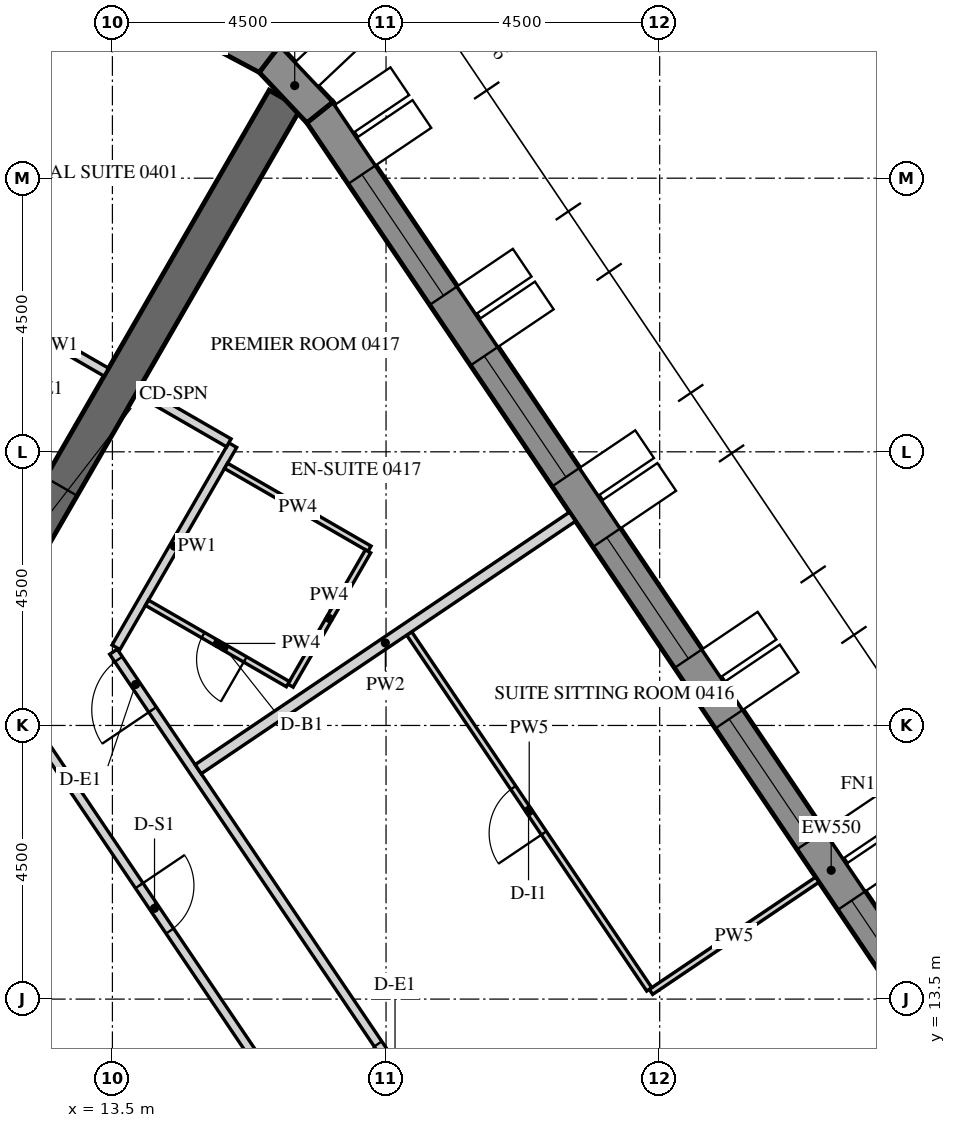
"""IFC4 building model, lengths in metres.
Left out: names, types, materials, properties, quantities, classifications, styles, units other than length and angle.
Written with IfcOpenShell. Run it as: python <this file> out.ifc"""

import sys

from ifc_helpers import new_model, si_unit, direction, frame, frame_2d, origin, place, context, subcontext, project, spatial, polyline, rectangle, outline, extrude, element, fill, save


model = new_model("IFC4")
c1 = context("Model", 3, precision=1e-05, world=origin(), true_north=direction((0.0, 1.0)))
c2 = subcontext(c1, "Body", "Model", "MODEL_VIEW")
j1 = project(units=[si_unit("LENGTHUNIT", "METRE"), si_unit("PLANEANGLEUNIT", "RADIAN")], contexts=[c1])
p1 = place(None, origin())
s1 = spatial("IfcSite", under=j1, at=p1, CompositionType="ELEMENT")
p2 = place(p1, origin())
s2 = spatial("IfcBuilding", under=s1, at=p2, CompositionType="ELEMENT")
p3 = place(p2, frame((0.0, 0.0, 68.7)))
s3 = spatial("IfcBuildingStorey", under=s2, at=p3, CompositionType="ELEMENT", Elevation=68.7)
p4 = place(p3, frame((33.728, 3.153, -0.15), z_axis=(0.0, 0.0, 1.0), x_axis=(-0.559192411416, 0.82903790445, 0.0)))
e1 = element("IfcWall", 1, at=p4, inside=s3, PredefinedType="SOLIDWALL", context=c2, shape_type="SweptSolid", body=[
    extrude(outline(polyline([(-0.026, -0.275), (30.093, -0.275), (30.048, 0.275), (0.026, 0.275), (-0.026, -0.275)])), origin(), (0.0, 0.0, 1.0), 3.9),
])
p5 = place(p4, frame((1.236, 0.0, 1.05)))
e2 = element("IfcOpeningElement", 2, at=p5, cuts=e1, PredefinedType="OPENING", context=c2, shape_type="SweptSolid", body=[
    extrude(rectangle(XDim=2.4, YDim=2.4, at=frame_2d((1.2, 1.2))), frame((0.0, 0.285, 0.0), z_axis=(0.0, -1.0, 0.0), x_axis=(1.0, 0.0, 0.0)), (0.0, 0.0, 1.0), 0.57),
])
p6 = place(p4, frame((4.835, 0.0, 1.05)))
e3 = element("IfcOpeningElement", 3, at=p6, cuts=e1, PredefinedType="OPENING", context=c2, shape_type="SweptSolid", body=[
    extrude(rectangle(XDim=2.4, YDim=2.4, at=frame_2d((1.2, 1.2))), frame((0.0, 0.285, 0.0), z_axis=(0.0, -1.0, 0.0), x_axis=(1.0, 0.0, 0.0)), (0.0, 0.0, 1.0), 0.57),
])
p7 = place(p4, frame((8.436, 0.0, 1.05)))
e4 = element("IfcOpeningElement", 4, at=p7, cuts=e1, PredefinedType="OPENING", context=c2, shape_type="SweptSolid", body=[
    extrude(rectangle(XDim=2.4, YDim=2.4, at=frame_2d((1.2, 1.2))), frame((0.0, 0.285, 0.0), z_axis=(0.0, -1.0, 0.0), x_axis=(1.0, 0.0, 0.0)), (0.0, 0.0, 1.0), 0.57),
])
p8 = place(p4, frame((12.035, 0.0, 1.05)))
e5 = element("IfcOpeningElement", 5, at=p8, cuts=e1, PredefinedType="OPENING", context=c2, shape_type="SweptSolid", body=[
    extrude(rectangle(XDim=2.4, YDim=2.4, at=frame_2d((1.2, 1.2))), frame((0.0, 0.285, 0.0), z_axis=(0.0, -1.0, 0.0), x_axis=(1.0, 0.0, 0.0)), (0.0, 0.0, 1.0), 0.57),
])
p9 = place(p4, frame((15.635, 0.0, 1.05)))
e6 = element("IfcOpeningElement", 6, at=p9, cuts=e1, PredefinedType="OPENING", context=c2, shape_type="SweptSolid", body=[
    extrude(rectangle(XDim=2.4, YDim=2.4, at=frame_2d((1.2, 1.2))), frame((0.0, 0.285, 0.0), z_axis=(0.0, -1.0, 0.0), x_axis=(1.0, 0.0, 0.0)), (0.0, 0.0, 1.0), 0.57),
])
p10 = place(p4, frame((19.236, 0.0, 1.05)))
e7 = element("IfcOpeningElement", 7, at=p10, cuts=e1, PredefinedType="OPENING", context=c2, shape_type="SweptSolid", body=[
    extrude(rectangle(XDim=2.4, YDim=2.4, at=frame_2d((1.2, 1.2))), frame((0.0, 0.285, 0.0), z_axis=(0.0, -1.0, 0.0), x_axis=(1.0, 0.0, 0.0)), (0.0, 0.0, 1.0), 0.57),
])
p11 = place(p4, frame((22.835, 0.0, 1.05)))
e8 = element("IfcOpeningElement", 8, at=p11, cuts=e1, PredefinedType="OPENING", context=c2, shape_type="SweptSolid", body=[
    extrude(rectangle(XDim=2.4, YDim=2.4, at=frame_2d((1.2, 1.2))), frame((0.0, 0.285, 0.0), z_axis=(0.0, -1.0, 0.0), x_axis=(1.0, 0.0, 0.0)), (0.0, 0.0, 1.0), 0.57),
])
p12 = place(p4, frame((26.436, 0.0, 1.05)))
e9 = element("IfcOpeningElement", 9, at=p12, cuts=e1, PredefinedType="OPENING", context=c2, shape_type="SweptSolid", body=[
    extrude(rectangle(XDim=2.4, YDim=2.4, at=frame_2d((1.2, 1.2))), frame((0.0, 0.285, 0.0), z_axis=(0.0, -1.0, 0.0), x_axis=(1.0, 0.0, 0.0)), (0.0, 0.0, 1.0), 0.57),
])
p13 = place(p3, frame((16.913, 28.083, -0.15), z_axis=(0.0, 0.0, 1.0), x_axis=(-0.686196220404, 0.727416488061, 0.0)))
e10 = element("IfcWall", 10, at=p13, inside=s3, PredefinedType="SOLIDWALL", context=c2, shape_type="SweptSolid", body=[
    extrude(outline(polyline([(-0.022, -0.275), (1.253, -0.275), (1.163, 0.275), (0.022, 0.275), (-0.022, -0.275)])), origin(), (0.0, 0.0, 1.0), 3.9),
])
p14 = place(p3, frame((16.083, 28.962, -0.15), z_axis=(0.0, 0.0, 1.0), x_axis=(-0.882995347911, 0.469381737574, 0.0)))
e11 = element("IfcWall", 11, at=p14, inside=s3, PredefinedType="SOLIDWALL", context=c2, shape_type="SweptSolid", body=[
    extrude(outline(polyline([(-0.045, -0.275), (1.253, -0.275), (1.163, 0.275), (0.045, 0.275), (-0.045, -0.275)])), origin(), (0.0, 0.0, 1.0), 3.9),
])
p15 = place(p3, frame((15.819, 0.0, -0.15), z_axis=(0.0, 0.0, 1.0), x_axis=(-0.499999880136, 0.866025472988, 0.0)))
e12 = element("IfcWall", 12, at=p15, inside=s3, PredefinedType="SHEAR", context=c2, shape_type="SweptSolid", body=[
    extrude(outline(polyline([(-0.173, -0.3), (15.993, -0.3), (15.646, 0.3), (0.173, 0.3), (-0.173, -0.3)])), origin(), (0.0, 0.0, 1.0), 3.9),
])
p16 = place(p15, frame((6.981, 0.0, 0.15)))
e13 = element("IfcOpeningElement", 13, at=p16, cuts=e12, PredefinedType="OPENING", context=c2, shape_type="SweptSolid", body=[
    extrude(rectangle(XDim=1.8, YDim=2.4, at=frame_2d((0.9, 1.2))), frame((0.0, 0.31, 0.0), z_axis=(0.0, -1.0, 0.0), x_axis=(1.0, 0.0, 0.0)), (0.0, 0.0, 1.0), 0.62),
])
p17 = place(p3, frame((8.083, 14.0, -0.15), z_axis=(0.0, 0.0, 1.0), x_axis=(0.499997680643, 0.866026742862, 0.0)))
e14 = element("IfcWall", 14, at=p17, inside=s3, PredefinedType="SHEAR", context=c2, shape_type="SweptSolid", body=[
    extrude(rectangle(XDim=16.509, YDim=0.6, at=frame_2d((8.254, 0.0))), origin(), (0.0, 0.0, 1.0), 3.9),
])
p18 = place(p17, frame((7.354, 0.0, 0.15)))
e15 = element("IfcOpeningElement", 15, at=p18, cuts=e14, PredefinedType="OPENING", context=c2, shape_type="SweptSolid", body=[
    extrude(rectangle(XDim=1.8, YDim=2.4, at=frame_2d((0.9, 1.2))), frame((0.0, 0.31, 0.0), z_axis=(0.0, -1.0, 0.0), x_axis=(1.0, 0.0, 0.0)), (0.0, 0.0, 1.0), 0.62),
])
p19 = place(p3, frame((13.4, 23.81, 0.0), z_axis=(0.0, 0.0, 1.0), x_axis=(-0.865989075817, 0.500062916607, 0.0)))
e16 = element("IfcWall", 16, at=p19, inside=s3, PredefinedType="PARTITIONING", context=c2, shape_type="SweptSolid", body=[
    extrude(rectangle(XDim=1.8, YDim=0.15, at=frame_2d((0.9, 0.0))), origin(), (0.0, 0.0, 1.0), 2.988),
])
p20 = place(p3, frame((25.821, 0.972, 0.0), z_axis=(0.0, 0.0, 1.0), x_axis=(-0.559193816298, 0.829036956845, 0.0)))
e17 = element("IfcWall", 17, at=p20, inside=s3, PredefinedType="PARTITIONING", context=c2, shape_type="SweptSolid", body=[
    extrude(rectangle(XDim=22.002, YDim=0.15, at=frame_2d((11.001, 0.0))), origin(), (0.0, 0.0, 1.0), 2.988),
])
p21 = place(p20, frame((3.269, 0.0, 0.0)))
e18 = element("IfcOpeningElement", 18, at=p21, cuts=e17, PredefinedType="OPENING", context=c2, shape_type="SweptSolid", body=[
    extrude(rectangle(XDim=1.0, YDim=2.1, at=frame_2d((0.5, 1.05))), frame((0.0, 0.085, 0.0), z_axis=(0.0, -1.0, 0.0), x_axis=(1.0, 0.0, 0.0)), (0.0, 0.0, 1.0), 0.17),
])
p22 = place(p20, frame((13.221, 0.0, 0.0)))
e19 = element("IfcOpeningElement", 19, at=p22, cuts=e17, PredefinedType="OPENING", context=c2, shape_type="SweptSolid", body=[
    extrude(rectangle(XDim=1.0, YDim=2.1, at=frame_2d((0.5, 1.05))), frame((0.0, 0.085, 0.0), z_axis=(0.0, -1.0, 0.0), x_axis=(1.0, 0.0, 0.0)), (0.0, 0.0, 1.0), 0.17),
])
p23 = place(p20, frame((20.852, 0.0, 0.0)))
e20 = element("IfcOpeningElement", 20, at=p23, cuts=e17, PredefinedType="OPENING", context=c2, shape_type="SweptSolid", body=[
    extrude(rectangle(XDim=1.0, YDim=2.1, at=frame_2d((0.5, 1.05))), frame((0.0, 0.085, 0.0), z_axis=(0.0, -1.0, 0.0), x_axis=(1.0, 0.0, 0.0)), (0.0, 0.0, 1.0), 0.17),
])
p24 = place(p3, frame((13.559, 19.285, 0.0), z_axis=(0.0, 0.0, 1.0), x_axis=(0.499975646431, 0.866039463868, 0.0)))
e21 = element("IfcWall", 21, at=p24, inside=s3, PredefinedType="PARTITIONING", context=c2, shape_type="SweptSolid", body=[
    extrude(rectangle(XDim=3.84, YDim=0.15, at=frame_2d((1.92, 0.0))), origin(), (0.0, 0.0, 1.0), 2.988),
])
p25 = place(p3, frame((15.414, 22.648, 0.0), z_axis=(0.0, 0.0, 1.0), x_axis=(-0.866074815912, 0.499914405916, 0.0)))
e22 = element("IfcWall", 22, at=p25, inside=s3, PredefinedType="PARTITIONING", context=c2, shape_type="SweptSolid", body=[
    extrude(rectangle(XDim=1.725, YDim=0.15, at=frame_2d((0.862, 0.0))), origin(), (0.0, 0.0, 1.0), 2.988),
])
p26 = place(p3, frame((11.465, 19.037, 0.0), z_axis=(0.0, 0.0, 1.0), x_axis=(0.559196064773, -0.829035440221, 0.0)))
e23 = element("IfcWall", 23, at=p26, inside=s3, PredefinedType="PARTITIONING", context=c2, shape_type="SweptSolid", body=[
    extrude(rectangle(XDim=9.757, YDim=0.15, at=frame_2d((4.878, 0.0))), origin(), (0.0, 0.0, 1.0), 2.988),
])
p27 = place(p26, frame((4.428, 0.0, 0.0)))
e24 = element("IfcOpeningElement", 24, at=p27, cuts=e23, PredefinedType="OPENING", context=c2, shape_type="SweptSolid", body=[
    extrude(rectangle(XDim=0.9, YDim=2.1, at=frame_2d((0.45, 1.05))), frame((0.0, 0.085, 0.0), z_axis=(0.0, -1.0, 0.0), x_axis=(1.0, 0.0, 0.0)), (0.0, 0.0, 1.0), 0.17),
])
p28 = place(p3, frame((25.092, 15.464, 0.0), z_axis=(0.0, 0.0, 1.0), x_axis=(-0.829033042551, -0.55919961942, 0.0)))
e25 = element("IfcWall", 25, at=p28, inside=s3, PredefinedType="PARTITIONING", context=c2, shape_type="SweptSolid", body=[
    extrude(rectangle(XDim=3.3, YDim=0.1, at=frame_2d((1.65, 0.0))), origin(), (0.0, 0.0, 1.0), 2.988),
])
p29 = place(p3, frame((22.329, 13.66, 0.0), z_axis=(0.0, 0.0, 1.0), x_axis=(-0.559216845309, 0.829021423078, 0.0)))
e26 = element("IfcWall", 26, at=p29, inside=s3, PredefinedType="PARTITIONING", context=c2, shape_type="SweptSolid", body=[
    extrude(rectangle(XDim=7.06, YDim=0.1, at=frame_2d((3.53, 0.0))), origin(), (0.0, 0.0, 1.0), 2.988),
])
p30 = place(p29, frame((3.1, 0.0, 0.0)))
e27 = element("IfcOpeningElement", 27, at=p30, cuts=e26, PredefinedType="OPENING", context=c2, shape_type="SweptSolid", body=[
    extrude(rectangle(XDim=0.9, YDim=2.1, at=frame_2d((0.45, 1.05))), frame((0.0, 0.06, 0.0), z_axis=(0.0, -1.0, 0.0), x_axis=(1.0, 0.0, 0.0)), (0.0, 0.0, 1.0), 0.12),
])
p31 = place(p3, frame((21.066, 21.433, 0.0), z_axis=(0.0, 0.0, 1.0), x_axis=(-0.829028170871, -0.559206841788, 0.0)))
e28 = element("IfcWall", 28, at=p31, inside=s3, PredefinedType="PARTITIONING", context=c2, shape_type="SweptSolid", body=[
    extrude(rectangle(XDim=7.425, YDim=0.18, at=frame_2d((3.712, 0.0))), origin(), (0.0, 0.0, 1.0), 2.988),
])
p32 = place(p3, frame((15.369, 22.27, 0.0), z_axis=(0.0, 0.0, 1.0), x_axis=(0.866034909742, -0.499983534837, 0.0)))
e29 = element("IfcWall", 29, at=p32, inside=s3, PredefinedType="PARTITIONING", context=c2, shape_type="SweptSolid", body=[
    extrude(rectangle(XDim=2.725, YDim=0.1, at=frame_2d((1.363, 0.0))), origin(), (0.0, 0.0, 1.0), 2.988),
])
p33 = place(p3, frame((17.704, 20.864, 0.0), z_axis=(0.0, 0.0, 1.0), x_axis=(-0.499948979701, -0.866054858364, 0.0)))
e30 = element("IfcWall", 30, at=p33, inside=s3, PredefinedType="PARTITIONING", context=c2, shape_type="SweptSolid", body=[
    extrude(rectangle(XDim=2.55, YDim=0.1, at=frame_2d((1.275, 0.0))), origin(), (0.0, 0.0, 1.0), 2.988),
])
p34 = place(p3, frame((16.385, 18.68, 0.0), z_axis=(0.0, 0.0, 1.0), x_axis=(-0.86604424267, 0.499967368674, 0.0)))
e31 = element("IfcWall", 31, at=p34, inside=s3, PredefinedType="PARTITIONING", context=c2, shape_type="SweptSolid", body=[
    extrude(rectangle(XDim=2.675, YDim=0.1, at=frame_2d((1.337, 0.0))), origin(), (0.0, 0.0, 1.0), 2.988),
])
p35 = place(p34, frame((0.81, 0.0, 0.0)))
e32 = element("IfcOpeningElement", 32, at=p35, cuts=e31, PredefinedType="OPENING", context=c2, shape_type="SweptSolid", body=[
    extrude(rectangle(XDim=0.8, YDim=2.1, at=frame_2d((0.4, 1.05))), frame((0.0, 0.06, 0.0), z_axis=(0.0, -1.0, 0.0), x_axis=(1.0, 0.0, 0.0)), (0.0, 0.0, 1.0), 0.12),
])
p36 = place(p8, frame((0.0, 0.205, 0.0)))
e33 = element("IfcWindow", 33, at=p36, inside=s3, PartitioningType="DOUBLE_PANEL_VERTICAL", PredefinedType="WINDOW", context=c2, shape_type="SweptSolid", body=[
    extrude(rectangle(XDim=2.4, YDim=2.4, at=frame_2d((1.2, 1.2))), frame((0.0, 0.03, 0.0), z_axis=(0.0, -1.0, 0.0), x_axis=(1.0, 0.0, 0.0)), (0.0, 0.0, 1.0), 0.06),
])
fill(e5, e33)
p37 = place(p9, frame((0.0, 0.205, 0.0)))
e34 = element("IfcWindow", 34, at=p37, inside=s3, PartitioningType="DOUBLE_PANEL_VERTICAL", PredefinedType="WINDOW", context=c2, shape_type="SweptSolid", body=[
    extrude(rectangle(XDim=2.4, YDim=2.4, at=frame_2d((1.2, 1.2))), frame((0.0, 0.03, 0.0), z_axis=(0.0, -1.0, 0.0), x_axis=(1.0, 0.0, 0.0)), (0.0, 0.0, 1.0), 0.06),
])
fill(e6, e34)
p38 = place(p10, frame((0.0, 0.205, 0.0)))
e35 = element("IfcWindow", 35, at=p38, inside=s3, PartitioningType="DOUBLE_PANEL_VERTICAL", PredefinedType="WINDOW", context=c2, shape_type="SweptSolid", body=[
    extrude(rectangle(XDim=2.4, YDim=2.4, at=frame_2d((1.2, 1.2))), frame((0.0, 0.03, 0.0), z_axis=(0.0, -1.0, 0.0), x_axis=(1.0, 0.0, 0.0)), (0.0, 0.0, 1.0), 0.06),
])
fill(e7, e35)
p39 = place(p11, frame((0.0, 0.205, 0.0)))
e36 = element("IfcWindow", 36, at=p39, inside=s3, PartitioningType="DOUBLE_PANEL_VERTICAL", PredefinedType="WINDOW", context=c2, shape_type="SweptSolid", body=[
    extrude(rectangle(XDim=2.4, YDim=2.4, at=frame_2d((1.2, 1.2))), frame((0.0, 0.03, 0.0), z_axis=(0.0, -1.0, 0.0), x_axis=(1.0, 0.0, 0.0)), (0.0, 0.0, 1.0), 0.06),
])
fill(e8, e36)
p40 = place(p12, frame((0.0, 0.205, 0.0)))
e37 = element("IfcWindow", 37, at=p40, inside=s3, PartitioningType="DOUBLE_PANEL_VERTICAL", PredefinedType="WINDOW", context=c2, shape_type="SweptSolid", body=[
    extrude(rectangle(XDim=2.4, YDim=2.4, at=frame_2d((1.2, 1.2))), frame((0.0, 0.03, 0.0), z_axis=(0.0, -1.0, 0.0), x_axis=(1.0, 0.0, 0.0)), (0.0, 0.0, 1.0), 0.06),
])
fill(e9, e37)
p41 = place(p18, origin())
e38 = element("IfcDoor", 38, at=p41, inside=s3, OperationType="DOUBLE_DOOR_SINGLE_SWING", PredefinedType="DOOR", context=c2, shape_type="SweptSolid", body=[
    extrude(rectangle(XDim=1.8, YDim=2.4, at=frame_2d((0.9, 1.2))), frame((0.0, 0.025, 0.0), z_axis=(0.0, -1.0, 0.0), x_axis=(1.0, 0.0, 0.0)), (0.0, 0.0, 1.0), 0.05),
])
fill(e15, e38)
p42 = place(p22, origin())
e39 = element("IfcDoor", 39, at=p42, inside=s3, OperationType="SINGLE_SWING_LEFT", PredefinedType="DOOR", context=c2, shape_type="SweptSolid", body=[
    extrude(rectangle(XDim=1.0, YDim=2.1, at=frame_2d((0.5, 1.05))), frame((0.0, 0.025, 0.0), z_axis=(0.0, -1.0, 0.0), x_axis=(1.0, 0.0, 0.0)), (0.0, 0.0, 1.0), 0.05),
])
fill(e19, e39)
p43 = place(p30, origin())
e40 = element("IfcDoor", 40, at=p43, inside=s3, OperationType="SINGLE_SWING_RIGHT", PredefinedType="DOOR", context=c2, shape_type="SweptSolid", body=[
    extrude(rectangle(XDim=0.9, YDim=2.1, at=frame_2d((0.45, 1.05))), frame((0.0, 0.025, 0.0), z_axis=(0.0, -1.0, 0.0), x_axis=(1.0, 0.0, 0.0)), (0.0, 0.0, 1.0), 0.05),
])
fill(e27, e40)
p44 = place(p23, origin())
e41 = element("IfcDoor", 41, at=p44, inside=s3, OperationType="SINGLE_SWING_LEFT", PredefinedType="DOOR", context=c2, shape_type="SweptSolid", body=[
    extrude(rectangle(XDim=1.0, YDim=2.1, at=frame_2d((0.5, 1.05))), frame((0.0, 0.025, 0.0), z_axis=(0.0, -1.0, 0.0), x_axis=(1.0, 0.0, 0.0)), (0.0, 0.0, 1.0), 0.05),
])
fill(e20, e41)
p45 = place(p35, origin())
e42 = element("IfcDoor", 42, at=p45, inside=s3, OperationType="SINGLE_SWING_RIGHT", PredefinedType="DOOR", context=c2, shape_type="SweptSolid", body=[
    extrude(rectangle(XDim=0.8, YDim=2.1, at=frame_2d((0.4, 1.05))), frame((0.0, 0.025, 0.0), z_axis=(0.0, -1.0, 0.0), x_axis=(1.0, 0.0, 0.0)), (0.0, 0.0, 1.0), 0.05),
])
fill(e32, e42)
p46 = place(p27, origin())
e43 = element("IfcDoor", 43, at=p46, inside=s3, OperationType="SINGLE_SWING_RIGHT", PredefinedType="DOOR", context=c2, shape_type="SweptSolid", body=[
    extrude(rectangle(XDim=0.9, YDim=2.1, at=frame_2d((0.45, 1.05))), frame((0.0, 0.025, 0.0), z_axis=(0.0, -1.0, 0.0), x_axis=(1.0, 0.0, 0.0)), (0.0, 0.0, 1.0), 0.05),
])
fill(e24, e43)
save(model, sys.argv[1])
